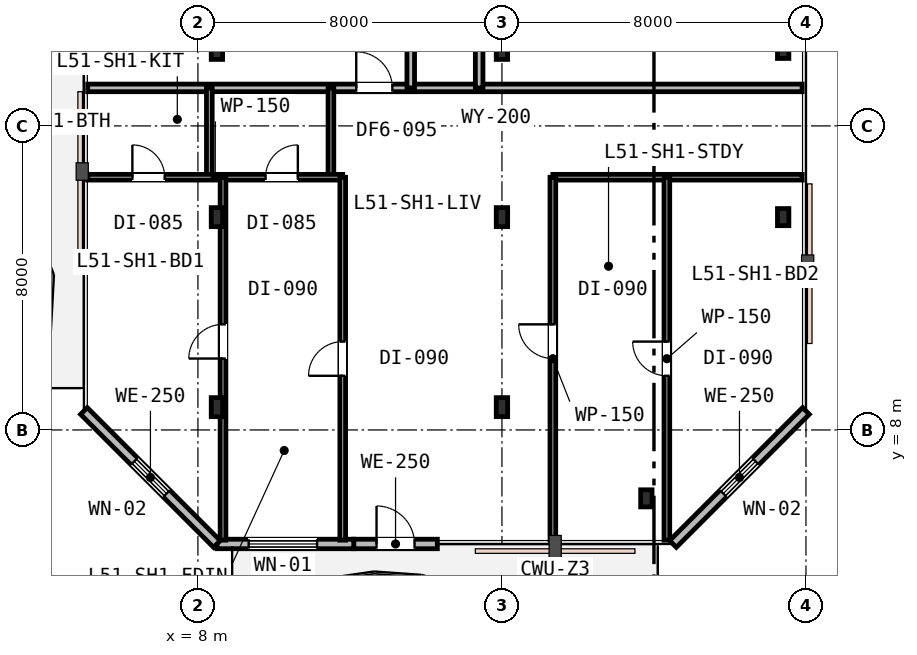
"""IFC4 building model, lengths in metres.
Left out: names, types, materials, properties, quantities, classifications, styles, units other than length and angle.
Written with IfcOpenShell. Run it as: python <this file> out.ifc"""

import sys

from ifc_helpers import new_model, si_unit, direction, frame, frame_2d, origin, origin_2d, place, context, subcontext, project, spatial, rectangle, i_section, extrude, element, fill, save


model = new_model("IFC4")
c1 = context("Model", 3, precision=1e-05, world=origin(), true_north=direction((0.0, 1.0)))
c2 = subcontext(c1, "Body", "Model", "MODEL_VIEW")
j1 = project(units=[si_unit("LENGTHUNIT", "METRE"), si_unit("PLANEANGLEUNIT", "RADIAN")], contexts=[c1])
p1 = place(None, origin())
s1 = spatial("IfcSite", under=j1, at=p1, CompositionType="ELEMENT")
p2 = place(p1, origin())
s2 = spatial("IfcBuilding", under=s1, at=p2, CompositionType="ELEMENT")
p3 = place(p2, frame((0.0, 0.0, 197.4)))
s3 = spatial("IfcBuildingStorey", under=s2, at=p3, CompositionType="ELEMENT", Elevation=197.4)
for number, where, z_axis, x_axis in (
    (1, (19.8, 6.2, 0.0), (0.0, 0.0, 1.0), (1.0, 0.0, 0.0)),
    (2, (23.4, 13.6, 0.0), (0.0, 0.0, 1.0), (1.0, 0.0, 0.0)),
    (3, (23.4, 18.0, 0.0), (0.0, 0.0, 1.0), (1.0, 0.0, 0.0)),
):
    element("IfcColumn", number, at=place(p3, frame(where, z_axis=z_axis, x_axis=x_axis)), inside=s3, PredefinedType="COLUMN", context=c2, shape_type="SweptSolid", body=[
        extrude(i_section(OverallWidth=0.3, OverallDepth=0.45, WebThickness=0.014, FlangeThickness=0.026, FilletRadius=0.027, at=origin_2d()), origin(), (0.0, 0.0, 1.0), 3.6),
    ])
for number, where, z_axis, x_axis in (
    (4, (8.5, 8.6, 0.0), (0.0, 0.0, 1.0), (1.0, 0.0, 0.0)),
    (5, (16.0, 8.6, 0.0), (0.0, 0.0, 1.0), (1.0, 0.0, 0.0)),
    (6, (8.5, 13.6, 0.0), (0.0, 0.0, 1.0), (1.0, 0.0, 0.0)),
    (7, (16.0, 13.6, 0.0), (0.0, 0.0, 1.0), (1.0, 0.0, 0.0)),
    (8, (8.5, 18.0, 0.0), (0.0, 0.0, 1.0), (1.0, 0.0, 0.0)),
    (9, (16.0, 18.0, 0.0), (0.0, 0.0, 1.0), (1.0, 0.0, 0.0)),
):
    element("IfcColumn", number, at=place(p3, frame(where, z_axis=z_axis, x_axis=x_axis)), inside=s3, PredefinedType="COLUMN", context=c2, shape_type="SweptSolid", body=[
        extrude(i_section(OverallWidth=0.3, OverallDepth=0.5, WebThickness=0.015, FlangeThickness=0.028, FilletRadius=0.027, at=origin_2d()), origin(), (0.0, 0.0, 1.0), 3.6),
    ])
p4 = place(p3, frame((12.1, 5.0, 0.0), z_axis=(0.0, 0.0, 1.0), x_axis=(1.0, 0.0, 0.0)))
e10 = element("IfcWall", 10, at=p4, inside=s3, PredefinedType="STANDARD", context=c2, shape_type="SweptSolid", body=[
    extrude(rectangle(XDim=2.2, YDim=0.25, at=frame_2d((1.1, 0.0))), origin(), (0.0, 0.0, 1.0), 3.33),
])
p5 = place(p4, frame((0.6, 0.0, 0.0)))
e11 = element("IfcOpeningElement", 11, at=p5, cuts=e10, PredefinedType="OPENING", context=c2, shape_type="SweptSolid", body=[
    extrude(rectangle(XDim=1.0, YDim=2.15, at=frame_2d((0.5, 1.075))), frame((0.0, 0.135, 0.0), z_axis=(0.0, -1.0, 0.0), x_axis=(1.0, 0.0, 0.0)), (0.0, 0.0, 1.0), 0.27),
])
p6 = place(p3, frame((8.5, 5.0, 0.0), z_axis=(0.0, 0.0, 1.0), x_axis=(1.0, 0.0, 0.0)))
e12 = element("IfcWall", 12, at=p6, inside=s3, PredefinedType="STANDARD", context=c2, shape_type="SweptSolid", body=[
    extrude(rectangle(XDim=3.6, YDim=0.25, at=frame_2d((1.8, 0.0))), origin(), (0.0, 0.0, 1.0), 3.33),
])
p7 = place(p6, frame((0.835, 0.0, 0.75)))
e13 = element("IfcOpeningElement", 13, at=p7, cuts=e12, PredefinedType="OPENING", context=c2, shape_type="SweptSolid", body=[
    extrude(rectangle(XDim=1.8, YDim=1.85, at=frame_2d((0.9, 0.925))), frame((0.0, 0.135, 0.0), z_axis=(0.0, -1.0, 0.0), x_axis=(1.0, 0.0, 0.0)), (0.0, 0.0, 1.0), 0.27),
])
p8 = place(p3, frame((20.5, 5.0, 0.0), z_axis=(0.0, 0.0, 1.0), x_axis=(0.707106781187, 0.707106781187, 0.0)))
e14 = element("IfcWall", 14, at=p8, inside=s3, PredefinedType="STANDARD", context=c2, shape_type="SweptSolid", body=[
    extrude(rectangle(XDim=4.95, YDim=0.25, at=frame_2d((2.475, 0.0))), origin(), (0.0, 0.0, 1.0), 3.33),
])
p9 = place(p8, frame((1.875, 0.0, 0.85)))
e15 = element("IfcOpeningElement", 15, at=p9, cuts=e14, PredefinedType="OPENING", context=c2, shape_type="SweptSolid", body=[
    extrude(rectangle(XDim=1.2, YDim=1.6, at=frame_2d((0.6, 0.8))), frame((0.0, 0.135, 0.0), z_axis=(0.0, -1.0, 0.0), x_axis=(1.0, 0.0, 0.0)), (0.0, 0.0, 1.0), 0.27),
])
p10 = place(p3, frame((5.0, 8.5, 0.0), z_axis=(0.0, 0.0, 1.0), x_axis=(0.707106781187, -0.707106781187, 0.0)))
e16 = element("IfcWall", 16, at=p10, inside=s3, PredefinedType="STANDARD", context=c2, shape_type="SweptSolid", body=[
    extrude(rectangle(XDim=4.95, YDim=0.25, at=frame_2d((2.475, 0.0))), origin(), (0.0, 0.0, 1.0), 3.33),
])
p11 = place(p10, frame((1.875, 0.0, 0.85)))
e17 = element("IfcOpeningElement", 17, at=p11, cuts=e16, PredefinedType="OPENING", context=c2, shape_type="SweptSolid", body=[
    extrude(rectangle(XDim=1.2, YDim=1.6, at=frame_2d((0.6, 0.8))), frame((0.0, 0.135, 0.0), z_axis=(0.0, -1.0, 0.0), x_axis=(1.0, 0.0, 0.0)), (0.0, 0.0, 1.0), 0.27),
])
p12 = place(p3, frame((5.1, 17.0, 0.0), z_axis=(0.0, 0.0, 1.0), x_axis=(1.0, 0.0, 0.0)))
e18 = element("IfcWall", 18, at=p12, inside=s3, PredefinedType="PARTITIONING", context=c2, shape_type="SweptSolid", body=[
    extrude(rectangle(XDim=18.8, YDim=0.2, at=frame_2d((9.4, 0.0))), origin(), (0.0, 0.0, 1.0), 2.92),
])
p13 = place(p12, frame((7.066, 0.0, 0.0)))
e19 = element("IfcOpeningElement", 19, at=p13, cuts=e18, PredefinedType="OPENING", context=c2, shape_type="SweptSolid", body=[
    extrude(rectangle(XDim=0.95, YDim=2.15, at=frame_2d((0.475, 1.075))), frame((0.0, 0.11, 0.0), z_axis=(0.0, -1.0, 0.0), x_axis=(1.0, 0.0, 0.0)), (0.0, 0.0, 1.0), 0.22),
])
p14 = place(p3, frame((13.6, 17.0, 0.0), z_axis=(0.0, 0.0, 1.0), x_axis=(0.0, 1.0, 0.0)))
e20 = element("IfcWall", 20, at=p14, inside=s3, PredefinedType="PARTITIONING", context=c2, shape_type="SweptSolid", body=[
    extrude(rectangle(XDim=11.6, YDim=0.2, at=frame_2d((5.8, 0.0))), origin(), (0.0, 0.0, 1.0), 2.92),
])
p15 = place(p14, frame((8.996, 0.0, 0.0)))
e21 = element("IfcOpeningElement", 21, at=p15, cuts=e20, PredefinedType="OPENING", context=c2, shape_type="SweptSolid", body=[
    extrude(rectangle(XDim=0.95, YDim=2.15, at=frame_2d((0.475, 1.075))), frame((0.0, 0.11, 0.0), z_axis=(0.0, -1.0, 0.0), x_axis=(1.0, 0.0, 0.0)), (0.0, 0.0, 1.0), 0.22),
])
p16 = place(p14, frame((2.269, 0.0, 0.0)))
e22 = element("IfcOpeningElement", 22, at=p16, cuts=e20, PredefinedType="OPENING", context=c2, shape_type="SweptSolid", body=[
    extrude(rectangle(XDim=0.95, YDim=2.15, at=frame_2d((0.475, 1.075))), frame((0.0, 0.11, 0.0), z_axis=(0.0, -1.0, 0.0), x_axis=(1.0, 0.0, 0.0)), (0.0, 0.0, 1.0), 0.22),
])
p17 = place(p3, frame((15.4, 17.0, 0.0), z_axis=(0.0, 0.0, 1.0), x_axis=(0.0, 1.0, 0.0)))
e23 = element("IfcWall", 23, at=p17, inside=s3, PredefinedType="PARTITIONING", context=c2, shape_type="SweptSolid", body=[
    extrude(rectangle(XDim=11.6, YDim=0.2, at=frame_2d((5.8, 0.0))), origin(), (0.0, 0.0, 1.0), 2.92),
])
p18 = place(p17, frame((9.095, 0.0, 0.0)))
e24 = element("IfcOpeningElement", 24, at=p18, cuts=e23, PredefinedType="OPENING", context=c2, shape_type="SweptSolid", body=[
    extrude(rectangle(XDim=0.95, YDim=2.15, at=frame_2d((0.475, 1.075))), frame((0.0, 0.11, 0.0), z_axis=(0.0, -1.0, 0.0), x_axis=(1.0, 0.0, 0.0)), (0.0, 0.0, 1.0), 0.22),
])
p19 = place(p17, frame((3.295, 0.0, 0.0)))
e25 = element("IfcOpeningElement", 25, at=p19, cuts=e23, PredefinedType="OPENING", context=c2, shape_type="SweptSolid", body=[
    extrude(rectangle(XDim=0.95, YDim=2.15, at=frame_2d((0.475, 1.075))), frame((0.0, 0.11, 0.0), z_axis=(0.0, -1.0, 0.0), x_axis=(1.0, 0.0, 0.0)), (0.0, 0.0, 1.0), 0.22),
])
p20 = place(p3, frame((11.5, 14.65, 0.0), z_axis=(0.0, 0.0, 1.0), x_axis=(0.0, 1.0, 0.0)))
e26 = element("IfcWall", 26, at=p20, inside=s3, PredefinedType="PARTITIONING", context=c2, shape_type="SweptSolid", body=[
    extrude(rectangle(XDim=2.35, YDim=0.15, at=frame_2d((1.175, 0.0))), origin(), (0.0, 0.0, 1.0), 3.07),
])
p21 = place(p3, frame((8.3, 14.65, 0.0), z_axis=(0.0, 0.0, 1.0), x_axis=(0.0, 1.0, 0.0)))
e27 = element("IfcWall", 27, at=p21, inside=s3, PredefinedType="PARTITIONING", context=c2, shape_type="SweptSolid", body=[
    extrude(rectangle(XDim=2.35, YDim=0.15, at=frame_2d((1.175, 0.0))), origin(), (0.0, 0.0, 1.0), 2.92),
])
p22 = place(p3, frame((5.1, 14.65, 0.0), z_axis=(0.0, 0.0, 1.0), x_axis=(1.0, 0.0, 0.0)))
e28 = element("IfcWall", 28, at=p22, inside=s3, PredefinedType="PARTITIONING", context=c2, shape_type="SweptSolid", body=[
    extrude(rectangle(XDim=6.71, YDim=0.15, at=frame_2d((3.355, 0.0))), origin(), (0.0, 0.0, 1.0), 2.92),
])
p23 = place(p22, frame((1.175, 0.0, 0.0)))
e29 = element("IfcOpeningElement", 29, at=p23, cuts=e28, PredefinedType="OPENING", context=c2, shape_type="SweptSolid", body=[
    extrude(rectangle(XDim=0.85, YDim=2.15, at=frame_2d((0.425, 1.075))), frame((0.0, 0.085, 0.0), z_axis=(0.0, -1.0, 0.0), x_axis=(1.0, 0.0, 0.0)), (0.0, 0.0, 1.0), 0.17),
])
p24 = place(p22, frame((4.679, 0.0, 0.0)))
e30 = element("IfcOpeningElement", 30, at=p24, cuts=e28, PredefinedType="OPENING", context=c2, shape_type="SweptSolid", body=[
    extrude(rectangle(XDim=0.85, YDim=2.15, at=frame_2d((0.425, 1.075))), frame((0.0, 0.085, 0.0), z_axis=(0.0, -1.0, 0.0), x_axis=(1.0, 0.0, 0.0)), (0.0, 0.0, 1.0), 0.17),
])
p25 = place(p3, frame((17.34, 14.65, 0.0), z_axis=(0.0, 0.0, 1.0), x_axis=(1.0, 0.0, 0.0)))
e31 = element("IfcWall", 31, at=p25, inside=s3, PredefinedType="PARTITIONING", context=c2, shape_type="SweptSolid", body=[
    extrude(rectangle(XDim=6.56, YDim=0.15, at=frame_2d((3.28, 0.0))), origin(), (0.0, 0.0, 1.0), 3.02),
])
p26 = place(p3, frame((8.66, 5.1, 0.0), z_axis=(0.0, 0.0, 1.0), x_axis=(0.0, 1.0, 0.0)))
e32 = element("IfcWall", 32, at=p26, inside=s3, PredefinedType="PARTITIONING", context=c2, shape_type="SweptSolid", body=[
    extrude(rectangle(XDim=9.55, YDim=0.15, at=frame_2d((4.775, 0.0))), origin(), (0.0, 0.0, 1.0), 2.92),
])
p27 = place(p26, frame((4.779, 0.0, 0.0)))
e33 = element("IfcOpeningElement", 33, at=p27, cuts=e32, PredefinedType="OPENING", context=c2, shape_type="SweptSolid", body=[
    extrude(rectangle(XDim=0.9, YDim=2.15, at=frame_2d((0.45, 1.075))), frame((0.0, 0.085, 0.0), z_axis=(0.0, -1.0, 0.0), x_axis=(1.0, 0.0, 0.0)), (0.0, 0.0, 1.0), 0.17),
])
p28 = place(p3, frame((20.34, 5.1, 0.0), z_axis=(0.0, 0.0, 1.0), x_axis=(0.0, 1.0, 0.0)))
e34 = element("IfcWall", 34, at=p28, inside=s3, PredefinedType="PARTITIONING", context=c2, shape_type="SweptSolid", body=[
    extrude(rectangle(XDim=9.55, YDim=0.15, at=frame_2d((4.775, 0.0))), origin(), (0.0, 0.0, 1.0), 2.92),
])
p29 = place(p28, frame((4.325, 0.0, 0.0)))
e35 = element("IfcOpeningElement", 35, at=p29, cuts=e34, PredefinedType="OPENING", context=c2, shape_type="SweptSolid", body=[
    extrude(rectangle(XDim=0.9, YDim=2.15, at=frame_2d((0.45, 1.075))), frame((0.0, 0.085, 0.0), z_axis=(0.0, -1.0, 0.0), x_axis=(1.0, 0.0, 0.0)), (0.0, 0.0, 1.0), 0.17),
])
p30 = place(p3, frame((17.34, 5.1, 0.0), z_axis=(0.0, 0.0, 1.0), x_axis=(0.0, 1.0, 0.0)))
e36 = element("IfcWall", 36, at=p30, inside=s3, PredefinedType="PARTITIONING", context=c2, shape_type="SweptSolid", body=[
    extrude(rectangle(XDim=9.55, YDim=0.15, at=frame_2d((4.775, 0.0))), origin(), (0.0, 0.0, 1.0), 2.92),
])
p31 = place(p30, frame((4.779, 0.0, 0.0)))
e37 = element("IfcOpeningElement", 37, at=p31, cuts=e36, PredefinedType="OPENING", context=c2, shape_type="SweptSolid", body=[
    extrude(rectangle(XDim=0.9, YDim=2.15, at=frame_2d((0.45, 1.075))), frame((0.0, 0.085, 0.0), z_axis=(0.0, -1.0, 0.0), x_axis=(1.0, 0.0, 0.0)), (0.0, 0.0, 1.0), 0.17),
])
p32 = place(p3, frame((11.81, 5.1, 0.0), z_axis=(0.0, 0.0, 1.0), x_axis=(0.0, 1.0, 0.0)))
e38 = element("IfcWall", 38, at=p32, inside=s3, PredefinedType="PARTITIONING", context=c2, shape_type="SweptSolid", body=[
    extrude(rectangle(XDim=9.55, YDim=0.15, at=frame_2d((4.775, 0.0))), origin(), (0.0, 0.0, 1.0), 2.92),
])
p33 = place(p32, frame((4.325, 0.0, 0.0)))
e39 = element("IfcOpeningElement", 39, at=p33, cuts=e38, PredefinedType="OPENING", context=c2, shape_type="SweptSolid", body=[
    extrude(rectangle(XDim=0.9, YDim=2.15, at=frame_2d((0.45, 1.075))), frame((0.0, 0.085, 0.0), z_axis=(0.0, -1.0, 0.0), x_axis=(1.0, 0.0, 0.0)), (0.0, 0.0, 1.0), 0.17),
])
p34 = place(p5, origin())
e40 = element("IfcDoor", 40, at=p34, inside=s3, OperationType="SINGLE_SWING_LEFT", PredefinedType="DOOR", context=c2, shape_type="SweptSolid", body=[
    extrude(rectangle(XDim=1.0, YDim=2.15, at=frame_2d((0.5, 1.075))), frame((0.0, 0.025, 0.0), z_axis=(0.0, -1.0, 0.0), x_axis=(1.0, 0.0, 0.0)), (0.0, 0.0, 1.0), 0.05),
])
fill(e11, e40)
p35 = place(p7, origin())
e41 = element("IfcWindow", 41, at=p35, inside=s3, PartitioningType="SINGLE_PANEL", PredefinedType="WINDOW", context=c2, shape_type="SweptSolid", body=[
    extrude(rectangle(XDim=1.8, YDim=1.85, at=frame_2d((0.9, 0.925))), frame((0.0, 0.03, 0.0), z_axis=(0.0, -1.0, 0.0), x_axis=(1.0, 0.0, 0.0)), (0.0, 0.0, 1.0), 0.06),
])
fill(e13, e41)
p36 = place(p9, origin())
e42 = element("IfcWindow", 42, at=p36, inside=s3, PartitioningType="SINGLE_PANEL", PredefinedType="WINDOW", context=c2, shape_type="SweptSolid", body=[
    extrude(rectangle(XDim=1.2, YDim=1.6, at=frame_2d((0.6, 0.8))), frame((0.0, 0.03, 0.0), z_axis=(0.0, -1.0, 0.0), x_axis=(1.0, 0.0, 0.0)), (0.0, 0.0, 1.0), 0.06),
])
fill(e15, e42)
p37 = place(p11, origin())
e43 = element("IfcWindow", 43, at=p37, inside=s3, PartitioningType="SINGLE_PANEL", PredefinedType="WINDOW", context=c2, shape_type="SweptSolid", body=[
    extrude(rectangle(XDim=1.2, YDim=1.6, at=frame_2d((0.6, 0.8))), frame((0.0, 0.03, 0.0), z_axis=(0.0, -1.0, 0.0), x_axis=(1.0, 0.0, 0.0)), (0.0, 0.0, 1.0), 0.06),
])
fill(e17, e43)
p38 = place(p13, origin())
e44 = element("IfcDoor", 44, at=p38, inside=s3, OperationType="SINGLE_SWING_LEFT", PredefinedType="DOOR", context=c2, shape_type="SweptSolid", body=[
    extrude(rectangle(XDim=0.95, YDim=2.15, at=frame_2d((0.475, 1.075))), frame((0.0, 0.025, 0.0), z_axis=(0.0, -1.0, 0.0), x_axis=(1.0, 0.0, 0.0)), (0.0, 0.0, 1.0), 0.05),
])
fill(e19, e44)
p39 = place(p23, origin())
e45 = element("IfcDoor", 45, at=p39, inside=s3, OperationType="SINGLE_SWING_LEFT", PredefinedType="DOOR", context=c2, shape_type="SweptSolid", body=[
    extrude(rectangle(XDim=0.85, YDim=2.15, at=frame_2d((0.425, 1.075))), frame((0.0, 0.025, 0.0), z_axis=(0.0, -1.0, 0.0), x_axis=(1.0, 0.0, 0.0)), (0.0, 0.0, 1.0), 0.05),
])
fill(e29, e45)
p40 = place(p24, origin())
e46 = element("IfcDoor", 46, at=p40, inside=s3, OperationType="SINGLE_SWING_RIGHT", PredefinedType="DOOR", context=c2, shape_type="SweptSolid", body=[
    extrude(rectangle(XDim=0.85, YDim=2.15, at=frame_2d((0.425, 1.075))), frame((0.0, 0.025, 0.0), z_axis=(0.0, -1.0, 0.0), x_axis=(1.0, 0.0, 0.0)), (0.0, 0.0, 1.0), 0.05),
])
fill(e30, e46)
p41 = place(p27, origin())
e47 = element("IfcDoor", 47, at=p41, inside=s3, OperationType="SINGLE_SWING_LEFT", PredefinedType="DOOR", context=c2, shape_type="SweptSolid", body=[
    extrude(rectangle(XDim=0.9, YDim=2.15, at=frame_2d((0.45, 1.075))), frame((0.0, 0.025, 0.0), z_axis=(0.0, -1.0, 0.0), x_axis=(1.0, 0.0, 0.0)), (0.0, 0.0, 1.0), 0.05),
])
fill(e33, e47)
p42 = place(p29, origin())
e48 = element("IfcDoor", 48, at=p42, inside=s3, OperationType="SINGLE_SWING_RIGHT", PredefinedType="DOOR", context=c2, shape_type="SweptSolid", body=[
    extrude(rectangle(XDim=0.9, YDim=2.15, at=frame_2d((0.45, 1.075))), frame((0.0, 0.025, 0.0), z_axis=(0.0, -1.0, 0.0), x_axis=(1.0, 0.0, 0.0)), (0.0, 0.0, 1.0), 0.05),
])
fill(e35, e48)
p43 = place(p31, origin())
e49 = element("IfcDoor", 49, at=p43, inside=s3, OperationType="SINGLE_SWING_RIGHT", PredefinedType="DOOR", context=c2, shape_type="SweptSolid", body=[
    extrude(rectangle(XDim=0.9, YDim=2.15, at=frame_2d((0.45, 1.075))), frame((0.0, 0.025, 0.0), z_axis=(0.0, -1.0, 0.0), x_axis=(1.0, 0.0, 0.0)), (0.0, 0.0, 1.0), 0.05),
])
fill(e37, e49)
p44 = place(p33, origin())
e50 = element("IfcDoor", 50, at=p44, inside=s3, OperationType="SINGLE_SWING_LEFT", PredefinedType="DOOR", context=c2, shape_type="SweptSolid", body=[
    extrude(rectangle(XDim=0.9, YDim=2.15, at=frame_2d((0.45, 1.075))), frame((0.0, 0.025, 0.0), z_axis=(0.0, -1.0, 0.0), x_axis=(1.0, 0.0, 0.0)), (0.0, 0.0, 1.0), 0.05),
])
fill(e39, e50)
save(model, sys.argv[1])
